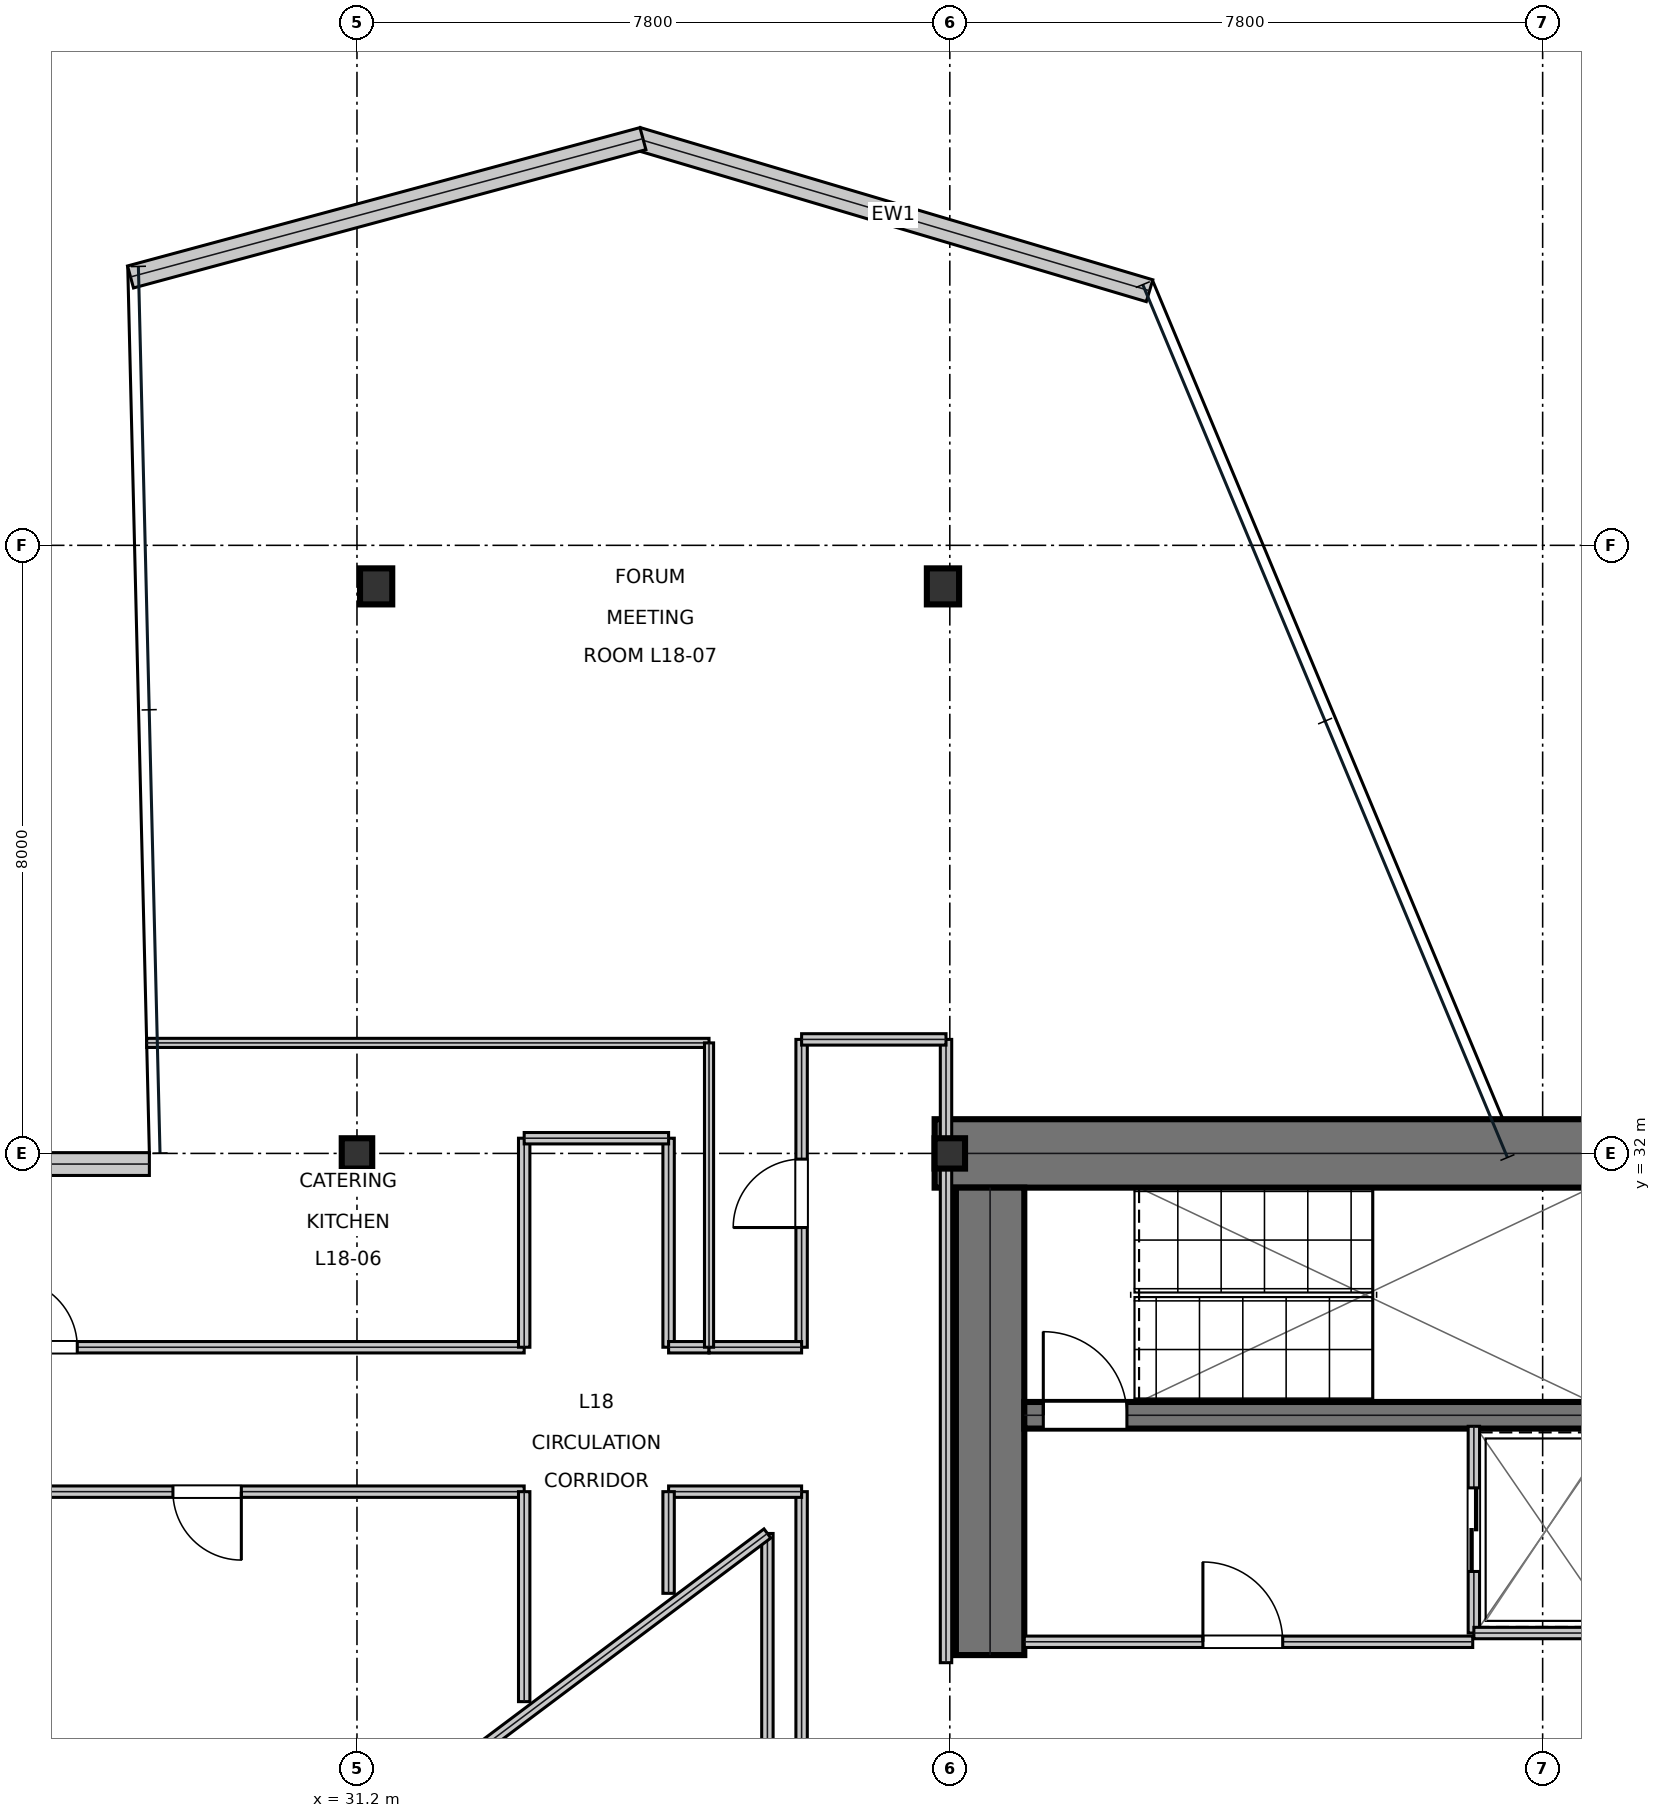
"""IFC4 building model, lengths in metres.
Left out: names, types, materials, properties, quantities, classifications, styles, units other than length and angle.
Written with IfcOpenShell. Run it as: python <this file> out.ifc"""

import sys

from ifc_helpers import new_model, si_unit, direction, frame, frame_2d, origin, origin_2d, place, context, subcontext, project, spatial, rectangle, i_section, extrude, element, fill, save


model = new_model("IFC4")
c1 = context("Model", 3, precision=1e-05, world=origin(), true_north=direction((0.0, 1.0)))
c2 = subcontext(c1, "Body", "Model", "MODEL_VIEW")
j1 = project(units=[si_unit("LENGTHUNIT", "METRE"), si_unit("PLANEANGLEUNIT", "RADIAN")], contexts=[c1])
p1 = place(None, origin())
s1 = spatial("IfcSite", under=j1, at=p1, CompositionType="ELEMENT")
p2 = place(p1, origin())
s2 = spatial("IfcBuilding", under=s1, at=p2, CompositionType="ELEMENT")
p3 = place(p2, frame((0.0, 0.0, 82.35)))
s3 = spatial("IfcBuildingStorey", under=s2, at=p3, CompositionType="ELEMENT", Elevation=82.35)
p4 = place(p3, frame((38.8, 32.0, 0.0), z_axis=(0.0, 0.0, 1.0), x_axis=(1.0, 0.0, 0.0)))
e1 = element("IfcWall", 1, at=p4, inside=s3, PredefinedType="SHEAR", context=c2, shape_type="SweptSolid", body=[
    extrude(rectangle(XDim=16.0, YDim=0.9, at=frame_2d((8.0, 0.0))), origin(), (0.0, 0.0, 1.0), 3.81),
])
p5 = place(p3, frame((39.53, 25.4, 0.0), z_axis=(0.0, 0.0, 1.0), x_axis=(0.0, 1.0, 0.0)))
e2 = element("IfcWall", 2, at=p5, inside=s3, PredefinedType="SHEAR", context=c2, shape_type="SweptSolid", body=[
    extrude(rectangle(XDim=6.15, YDim=0.9, at=frame_2d((3.075, 0.0))), origin(), (0.0, 0.0, 1.0), 3.81),
])
p6 = place(p3, frame((39.98, 28.555, 0.0), z_axis=(0.0, 0.0, 1.0), x_axis=(1.0, 0.0, 0.0)))
e3 = element("IfcWall", 3, at=p6, inside=s3, PredefinedType="SHEAR", context=c2, shape_type="SweptSolid", body=[
    extrude(rectangle(XDim=7.71, YDim=0.35, at=frame_2d((3.855, 0.0))), origin(), (0.0, 0.0, 1.0), 3.81),
])
p7 = place(p6, frame((0.25, 0.0, 0.0)))
e4 = element("IfcOpeningElement", 4, at=p7, cuts=e3, PredefinedType="OPENING", context=c2, shape_type="SweptSolid", body=[
    extrude(rectangle(XDim=1.1, YDim=2.15, at=frame_2d((0.55, 1.075))), frame((0.0, 0.185, 0.0), z_axis=(0.0, -1.0, 0.0), x_axis=(1.0, 0.0, 0.0)), (0.0, 0.0, 1.0), 0.37),
])
for number, where, z_axis, x_axis in (
    (5, (31.2, 32.0, 0.0), (0.0, 0.0, 1.0), (1.0, 0.0, 0.0)),
    (6, (39.0, 32.0, 0.0), (0.0, 0.0, 1.0), (1.0, 0.0, 0.0)),
):
    element("IfcColumn", number, at=place(p3, frame(where, z_axis=z_axis, x_axis=x_axis)), inside=s3, PredefinedType="COLUMN", context=c2, shape_type="SweptSolid", body=[
        extrude(i_section(OverallWidth=0.401, OverallDepth=0.399, WebThickness=0.025, FlangeThickness=0.04, at=origin_2d()), origin(), (0.0, 0.0, 1.0), 4.044),
    ])
p8 = place(p3, frame((31.452, 39.46, 0.016), z_axis=(0.013967388966, -0.029817339053, 0.999457772163), x_axis=(0.905569653976, 0.424197597586, 0.0)))
e7 = element("IfcColumn", 7, at=p8, inside=s3, PredefinedType="COLUMN", context=c2, shape_type="SweptSolid", body=[
    extrude(i_section(OverallWidth=0.424, OverallDepth=0.474, WebThickness=0.048, FlangeThickness=0.077, at=origin_2d()), origin(), (0.0, 0.0, 1.0), 4.02),
])
p9 = place(p3, frame((38.91, 39.46, 0.016), z_axis=(-0.004980101856, -0.029819878186, 0.999542882247), x_axis=(0.986339577116, -0.164724735893, 0.0)))
e8 = element("IfcColumn", 8, at=p9, inside=s3, PredefinedType="COLUMN", context=c2, shape_type="SweptSolid", body=[
    extrude(i_section(OverallWidth=0.424, OverallDepth=0.474, WebThickness=0.048, FlangeThickness=0.077, at=origin_2d()), origin(), (0.0, 0.0, 1.0), 4.02),
])
p10 = place(p3, frame((41.628, 43.35, 0.0), z_axis=(0.0, 0.0, 1.0), x_axis=(-0.958632659024, 0.284646140064, 0.0)))
e9 = element("IfcWall", 9, at=p10, inside=s3, PredefinedType="STANDARD", context=c2, shape_type="SweptSolid", body=[
    extrude(rectangle(XDim=7.033, YDim=0.3, at=frame_2d((3.517, 0.0))), origin(), (0.0, 0.0, 1.0), 3.81),
])
p11 = place(p3, frame((34.962, 45.351, 0.0), z_axis=(0.0, 0.0, 1.0), x_axis=(-0.965438319853, -0.260631637679, 0.0)))
e10 = element("IfcWall", 10, at=p11, inside=s3, PredefinedType="STANDARD", context=c2, shape_type="SweptSolid", body=[
    extrude(rectangle(XDim=6.983, YDim=0.3, at=frame_2d((3.492, 0.0))), origin(), (0.0, 0.0, 1.0), 3.81),
])
p12 = place(p3, frame((28.469, 31.86, 0.0), z_axis=(0.0, 0.0, 1.0), x_axis=(-1.0, 0.0, 0.0)))
e11 = element("IfcWall", 11, at=p12, inside=s3, PredefinedType="STANDARD", context=c2, shape_type="SweptSolid", body=[
    extrude(rectangle(XDim=2.781, YDim=0.3, at=frame_2d((1.39, 0.0))), origin(), (0.0, 0.0, 1.0), 3.81),
])
p13 = place(p3, frame((39.98, 25.575, 0.0), z_axis=(0.0, 0.0, 1.0), x_axis=(1.0, 0.0, 0.0)))
e12 = element("IfcWall", 12, at=p13, inside=s3, PredefinedType="PARTITIONING", context=c2, shape_type="SweptSolid", body=[
    extrude(rectangle(XDim=5.9, YDim=0.15, at=frame_2d((2.95, 0.0))), origin(), (0.0, 0.0, 1.0), 3.81),
])
p14 = place(p13, frame((2.35, 0.0, 0.0)))
e13 = element("IfcOpeningElement", 13, at=p14, cuts=e12, PredefinedType="OPENING", context=c2, shape_type="SweptSolid", body=[
    extrude(rectangle(XDim=1.05, YDim=2.15, at=frame_2d((0.525, 1.075))), frame((0.0, 0.085, 0.0), z_axis=(0.0, -1.0, 0.0), x_axis=(1.0, 0.0, 0.0)), (0.0, 0.0, 1.0), 0.17),
])
p15 = place(p3, frame((45.895, 25.69, 0.0), z_axis=(0.0, 0.0, 1.0), x_axis=(0.0, 1.0, 0.0)))
e14 = element("IfcWall", 14, at=p15, inside=s3, PredefinedType="PARTITIONING", context=c2, shape_type="SweptSolid", body=[
    extrude(rectangle(XDim=2.72, YDim=0.15, at=frame_2d((1.36, 0.0))), origin(), (0.0, 0.0, 1.0), 3.81),
])
p16 = place(p15, frame((0.81, 0.0, 0.0)))
e15 = element("IfcOpeningElement", 15, at=p16, cuts=e14, PredefinedType="OPENING", context=c2, shape_type="SweptSolid", body=[
    extrude(rectangle(XDim=1.1, YDim=2.15, at=frame_2d((0.55, 1.075))), frame((0.0, 0.085, 0.0), z_axis=(0.0, -1.0, 0.0), x_axis=(1.0, 0.0, 0.0)), (0.0, 0.0, 1.0), 0.17),
])
p17 = place(p3, frame((45.895, 25.69, 0.0), z_axis=(0.0, 0.0, 1.0), x_axis=(1.0, 0.0, 0.0)))
e16 = element("IfcWall", 16, at=p17, inside=s3, PredefinedType="PARTITIONING", context=c2, shape_type="SweptSolid", body=[
    extrude(rectangle(XDim=1.915, YDim=0.15, at=frame_2d((0.958, 0.0))), origin(), (0.0, 0.0, 1.0), 3.81),
])
p18 = place(p3, frame((25.057, 27.55, 0.0), z_axis=(0.0, 0.0, 1.0), x_axis=(1.0, 0.0, 0.0)))
e17 = element("IfcWall", 17, at=p18, inside=s3, PredefinedType="PARTITIONING", context=c2, shape_type="SweptSolid", body=[
    extrude(rectangle(XDim=8.343, YDim=0.15, at=frame_2d((4.171, 0.0))), origin(), (0.0, 0.0, 1.0), 3.181),
])
p19 = place(p18, frame((3.721, 0.0, 0.0)))
e18 = element("IfcOpeningElement", 18, at=p19, cuts=e17, PredefinedType="OPENING", context=c2, shape_type="SweptSolid", body=[
    extrude(rectangle(XDim=0.9, YDim=2.15, at=frame_2d((0.45, 1.075))), frame((0.0, 0.085, 0.0), z_axis=(0.0, -1.0, 0.0), x_axis=(1.0, 0.0, 0.0)), (0.0, 0.0, 1.0), 0.17),
])
p20 = place(p3, frame((14.62, 29.45, 0.0), z_axis=(0.0, 0.0, 1.0), x_axis=(1.0, 0.0, 0.0)))
e19 = element("IfcWall", 19, at=p20, inside=s3, PredefinedType="PARTITIONING", context=c2, shape_type="SweptSolid", body=[
    extrude(rectangle(XDim=18.78, YDim=0.15, at=frame_2d((9.39, 0.0))), origin(), (0.0, 0.0, 1.0), 3.181),
])
p21 = place(p20, frame((12.0, 0.0, 0.0)))
e20 = element("IfcOpeningElement", 20, at=p21, cuts=e19, PredefinedType="OPENING", context=c2, shape_type="SweptSolid", body=[
    extrude(rectangle(XDim=0.9, YDim=2.15, at=frame_2d((0.45, 1.075))), frame((0.0, 0.085, 0.0), z_axis=(0.0, -1.0, 0.0), x_axis=(1.0, 0.0, 0.0)), (0.0, 0.0, 1.0), 0.17),
])
p22 = place(p3, frame((37.05, 29.45, 0.0), z_axis=(0.0, 0.0, 1.0), x_axis=(0.0, 1.0, 0.0)))
e21 = element("IfcWall", 21, at=p22, inside=s3, PredefinedType="PARTITIONING", context=c2, shape_type="SweptSolid", body=[
    extrude(rectangle(XDim=4.05, YDim=0.15, at=frame_2d((2.025, 0.0))), origin(), (0.0, 0.0, 1.0), 3.181),
])
p23 = place(p22, frame((1.575, 0.0, 0.0)))
e22 = element("IfcOpeningElement", 22, at=p23, cuts=e21, PredefinedType="OPENING", context=c2, shape_type="SweptSolid", body=[
    extrude(rectangle(XDim=0.9, YDim=2.15, at=frame_2d((0.45, 1.075))), frame((0.0, 0.085, 0.0), z_axis=(0.0, -1.0, 0.0), x_axis=(1.0, 0.0, 0.0)), (0.0, 0.0, 1.0), 0.17),
])
p24 = place(p3, frame((37.05, 14.546, 0.0), z_axis=(0.0, 0.0, 1.0), x_axis=(0.0, 1.0, 0.0)))
e23 = element("IfcWall", 23, at=p24, inside=s3, PredefinedType="PARTITIONING", context=c2, shape_type="SweptSolid", body=[
    extrude(rectangle(XDim=13.004, YDim=0.15, at=frame_2d((6.502, 0.0))), origin(), (0.0, 0.0, 1.0), 3.181),
])
p25 = place(p3, frame((35.3, 27.55, 0.0), z_axis=(0.0, 0.0, 1.0), x_axis=(1.0, 0.0, 0.0)))
e24 = element("IfcWall", 24, at=p25, inside=s3, PredefinedType="PARTITIONING", context=c2, shape_type="SweptSolid", body=[
    extrude(rectangle(XDim=1.75, YDim=0.15, at=frame_2d((0.875, 0.0))), origin(), (0.0, 0.0, 1.0), 3.391),
])
p26 = place(p3, frame((35.3, 26.212, 0.0), z_axis=(0.0, 0.0, 1.0), x_axis=(0.0, 1.0, 0.0)))
e25 = element("IfcWall", 25, at=p26, inside=s3, PredefinedType="PARTITIONING", context=c2, shape_type="SweptSolid", body=[
    extrude(rectangle(XDim=1.338, YDim=0.15, at=frame_2d((0.669, 0.0))), origin(), (0.0, 0.0, 1.0), 3.81),
])
p27 = place(p3, frame((33.4, 24.788, 0.0), z_axis=(0.0, 0.0, 1.0), x_axis=(0.0, 1.0, 0.0)))
e26 = element("IfcWall", 26, at=p27, inside=s3, PredefinedType="PARTITIONING", context=c2, shape_type="SweptSolid", body=[
    extrude(rectangle(XDim=2.762, YDim=0.15, at=frame_2d((1.381, 0.0))), origin(), (0.0, 0.0, 1.0), 3.81),
])
for number, where, z_axis, x_axis in (
    (27, (33.4, 29.45, 0.0), (0.0, 0.0, 1.0), (0.0, 1.0, 0.0)),
    (28, (35.3, 29.45, 0.0), (0.0, 0.0, 1.0), (0.0, 1.0, 0.0)),
):
    element("IfcWall", number, at=place(p3, frame(where, z_axis=z_axis, x_axis=x_axis)), inside=s3, PredefinedType="PARTITIONING", context=c2, shape_type="SweptSolid", body=[
        extrude(rectangle(XDim=2.75, YDim=0.15, at=frame_2d((1.375, 0.0))), origin(), (0.0, 0.0, 1.0), 3.181),
    ])
p28 = place(p3, frame((33.4, 32.2, 0.0), z_axis=(0.0, 0.0, 1.0), x_axis=(1.0, 0.0, 0.0)))
e29 = element("IfcWall", 29, at=p28, inside=s3, PredefinedType="PARTITIONING", context=c2, shape_type="SweptSolid", body=[
    extrude(rectangle(XDim=1.9, YDim=0.15, at=frame_2d((0.95, 0.0))), origin(), (0.0, 0.0, 1.0), 3.181),
])
p29 = place(p3, frame((35.3, 29.45, 0.0), z_axis=(0.0, 0.0, 1.0), x_axis=(1.0, 0.0, 0.0)))
e30 = element("IfcWall", 30, at=p29, inside=s3, PredefinedType="PARTITIONING", context=c2, shape_type="SweptSolid", body=[
    extrude(rectangle(XDim=0.532, YDim=0.15, at=frame_2d((0.266, 0.0))), origin(), (0.0, 0.0, 1.0), 3.81),
])
p30 = place(p3, frame((38.95, 25.3, 0.0), z_axis=(0.0, 0.0, 1.0), x_axis=(0.0, 1.0, 0.0)))
e31 = element("IfcWall", 31, at=p30, inside=s3, PredefinedType="PARTITIONING", context=c2, shape_type="SweptSolid", body=[
    extrude(rectangle(XDim=8.2, YDim=0.15, at=frame_2d((4.1, 0.0))), origin(), (0.0, 0.0, 1.0), 3.181),
])
p31 = place(p3, frame((37.05, 33.5, 0.0), z_axis=(0.0, 0.0, 1.0), x_axis=(1.0, 0.0, 0.0)))
e32 = element("IfcWall", 32, at=p31, inside=s3, PredefinedType="PARTITIONING", context=c2, shape_type="SweptSolid", body=[
    extrude(rectangle(XDim=1.9, YDim=0.15, at=frame_2d((0.95, 0.0))), origin(), (0.0, 0.0, 1.0), 3.181),
])
p32 = place(p3, frame((35.832, 29.45, 0.0), z_axis=(0.0, 0.0, 1.0), x_axis=(1.0, 0.0, 0.0)))
e33 = element("IfcWall", 33, at=p32, inside=s3, PredefinedType="PARTITIONING", context=c2, shape_type="SweptSolid", body=[
    extrude(rectangle(XDim=1.218, YDim=0.15, at=frame_2d((0.609, 0.0))), origin(), (0.0, 0.0, 1.0), 3.81),
])
p33 = place(p3, frame((28.433, 33.454, 0.0), z_axis=(0.0, 0.0, 1.0), x_axis=(1.0, 0.0, 0.0)))
e34 = element("IfcWall", 34, at=p33, inside=s3, PredefinedType="PARTITIONING", context=c2, shape_type="SweptSolid", body=[
    extrude(rectangle(XDim=7.399, YDim=0.12, at=frame_2d((3.699, 0.0))), origin(), (0.0, 0.0, 1.0), 3.338),
])
p34 = place(p3, frame((35.832, 29.45, 0.0), z_axis=(0.0, 0.0, 1.0), x_axis=(0.0, 1.0, 0.0)))
e35 = element("IfcWall", 35, at=p34, inside=s3, PredefinedType="PARTITIONING", context=c2, shape_type="SweptSolid", body=[
    extrude(rectangle(XDim=4.004, YDim=0.12, at=frame_2d((2.002, 0.0))), origin(), (0.0, 0.0, 1.0), 3.181),
])
p35 = place(p3, frame((36.6, 21.0, 0.0), z_axis=(0.0, 0.0, 1.0), x_axis=(0.0, 1.0, 0.0)))
e36 = element("IfcWall", 36, at=p35, inside=s3, PredefinedType="MOVABLE", context=c2, shape_type="SweptSolid", body=[
    extrude(rectangle(XDim=6.0, YDim=0.15, at=frame_2d((3.0, 0.0))), origin(), (0.0, 0.0, 1.0), 3.81),
])
p36 = place(p3, frame((36.6, 27.0, 0.0), z_axis=(0.0, 0.0, 1.0), x_axis=(-0.8, -0.6, 0.0)))
e37 = element("IfcWall", 37, at=p36, inside=s3, PredefinedType="MOVABLE", context=c2, shape_type="SweptSolid", body=[
    extrude(rectangle(XDim=5.0, YDim=0.15, at=frame_2d((2.5, 0.0))), origin(), (0.0, 0.0, 1.0), 3.81),
])
p37 = place(p14, origin())
e38 = element("IfcDoor", 38, at=p37, inside=s3, OperationType="SINGLE_SWING_LEFT", PredefinedType="DOOR", context=c2, shape_type="SweptSolid", body=[
    extrude(rectangle(XDim=1.05, YDim=2.15, at=frame_2d((0.525, 1.075))), frame((0.0, 0.025, 0.0), z_axis=(0.0, -1.0, 0.0), x_axis=(1.0, 0.0, 0.0)), (0.0, 0.0, 1.0), 0.05),
])
fill(e13, e38)
p38 = place(p16, frame((1.1, 0.0, 0.0), z_axis=(0.0, 0.0, 1.0), x_axis=(-1.0, 0.0, 0.0)))
e39 = element("IfcDoor", 39, at=p38, inside=s3, OperationType="DOUBLE_DOOR_SLIDING", PredefinedType="DOOR", context=c2, shape_type="SweptSolid", body=[
    extrude(rectangle(XDim=1.1, YDim=2.15, at=frame_2d((0.55, 1.075))), frame((0.0, 0.025, 0.0), z_axis=(0.0, -1.0, 0.0), x_axis=(1.0, 0.0, 0.0)), (0.0, 0.0, 1.0), 0.05),
])
fill(e15, e39)
p39 = place(p19, frame((0.9, 0.0, 0.0), z_axis=(0.0, 0.0, 1.0), x_axis=(-1.0, 0.0, 0.0)))
e40 = element("IfcDoor", 40, at=p39, inside=s3, OperationType="SINGLE_SWING_LEFT", PredefinedType="DOOR", context=c2, shape_type="SweptSolid", body=[
    extrude(rectangle(XDim=0.9, YDim=2.15, at=frame_2d((0.45, 1.075))), frame((0.0, 0.025, 0.0), z_axis=(0.0, -1.0, 0.0), x_axis=(1.0, 0.0, 0.0)), (0.0, 0.0, 1.0), 0.05),
])
fill(e18, e40)
p40 = place(p21, origin())
e41 = element("IfcDoor", 41, at=p40, inside=s3, OperationType="SINGLE_SWING_LEFT", PredefinedType="DOOR", context=c2, shape_type="SweptSolid", body=[
    extrude(rectangle(XDim=0.9, YDim=2.15, at=frame_2d((0.45, 1.075))), frame((0.0, 0.025, 0.0), z_axis=(0.0, -1.0, 0.0), x_axis=(1.0, 0.0, 0.0)), (0.0, 0.0, 1.0), 0.05),
])
fill(e20, e41)
p41 = place(p23, origin())
e42 = element("IfcDoor", 42, at=p41, inside=s3, OperationType="SINGLE_SWING_LEFT", PredefinedType="DOOR", context=c2, shape_type="SweptSolid", body=[
    extrude(rectangle(XDim=0.9, YDim=2.15, at=frame_2d((0.45, 1.075))), frame((0.0, 0.025, 0.0), z_axis=(0.0, -1.0, 0.0), x_axis=(1.0, 0.0, 0.0)), (0.0, 0.0, 1.0), 0.05),
])
fill(e22, e42)
p42 = place(p7, origin())
e43 = element("IfcDoor", 43, at=p42, inside=s3, OperationType="SINGLE_SWING_LEFT", PredefinedType="DOOR", context=c2, shape_type="SweptSolid", body=[
    extrude(rectangle(XDim=1.1, YDim=2.15, at=frame_2d((0.55, 1.075))), frame((0.0, 0.025, 0.0), z_axis=(0.0, -1.0, 0.0), x_axis=(1.0, 0.0, 0.0)), (0.0, 0.0, 1.0), 0.05),
])
fill(e4, e43)
save(model, sys.argv[1])
